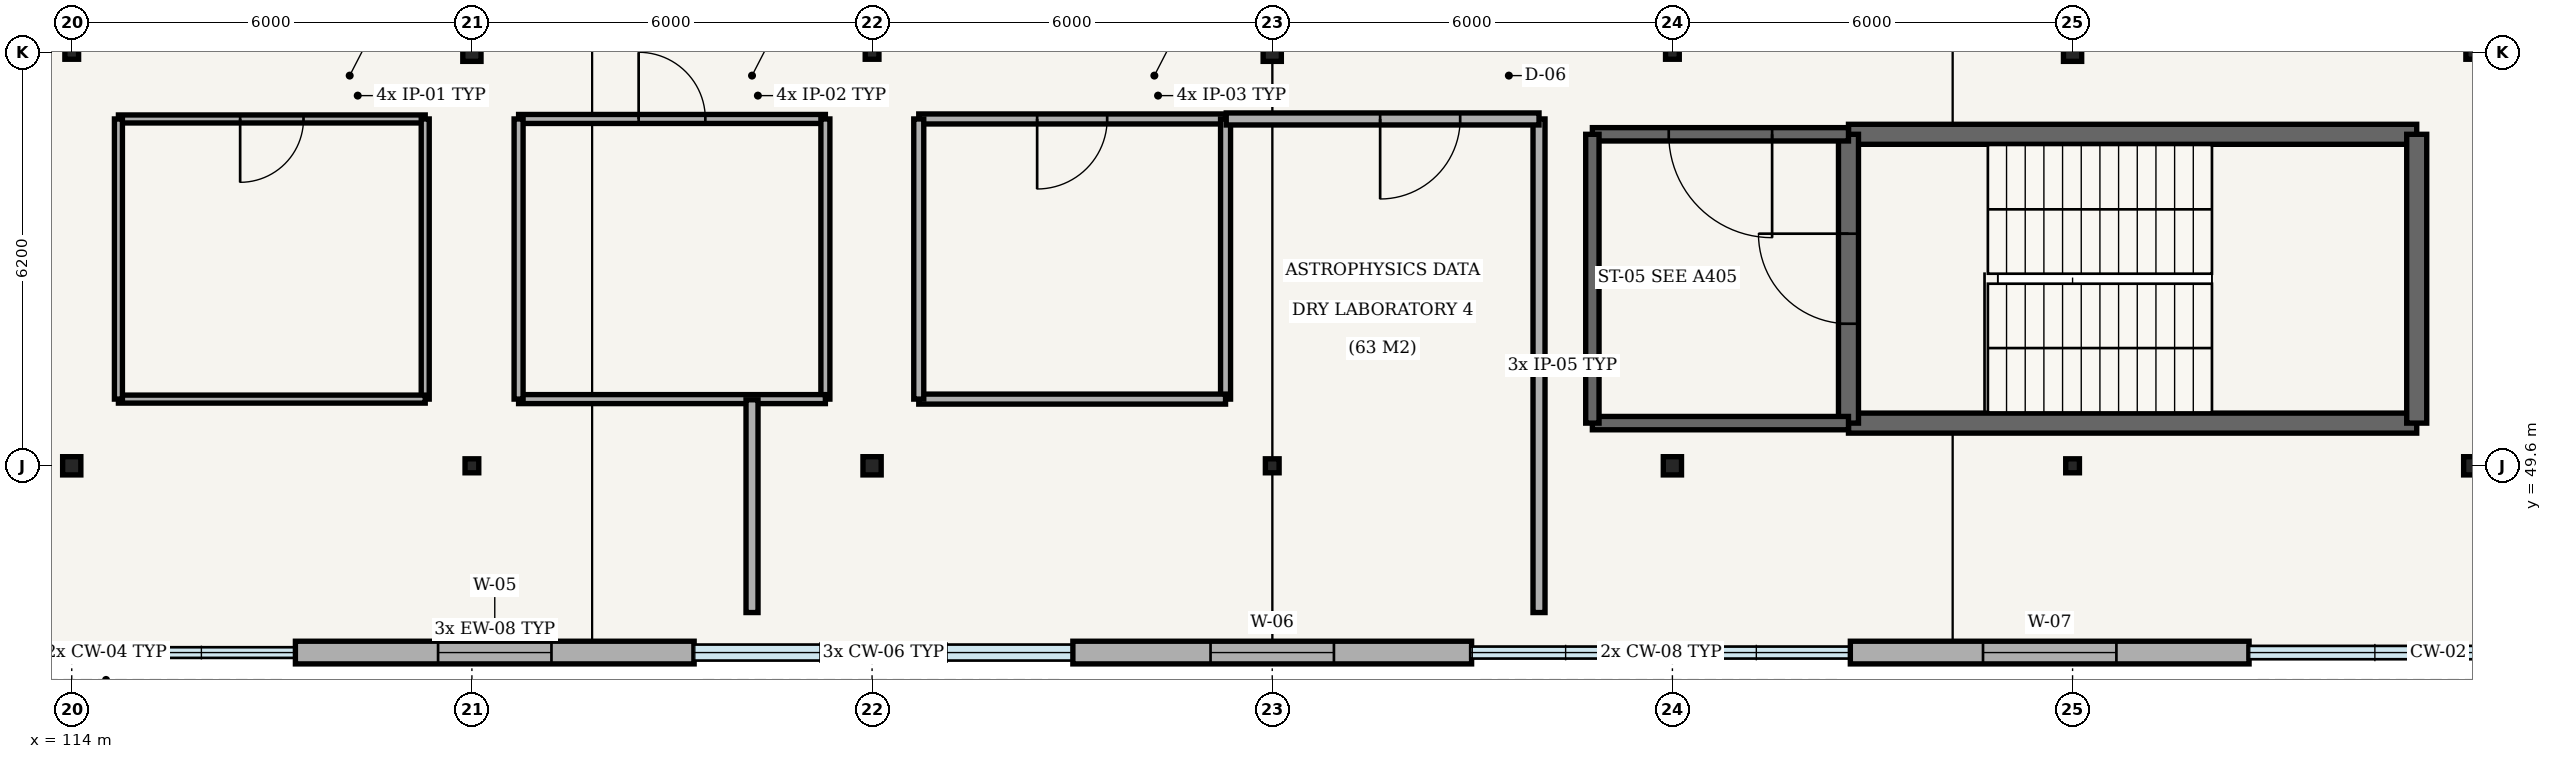
"""IFC4 building model, lengths in metres.
Left out: names, types, materials, properties, quantities, classifications, styles, units other than length and angle.
Written with IfcOpenShell. Run it as: python <this file> out.ifc"""

import sys

from ifc_helpers import new_model, si_unit, direction, frame, frame_2d, origin, origin_2d, place, context, subcontext, project, spatial, rectangle, hollow_circle, i_section, extrude, element, fill, save


model = new_model("IFC4")
c1 = context("Model", 3, precision=1e-05, world=origin(), true_north=direction((0.0, 1.0)))
c2 = subcontext(c1, "Body", "Model", "MODEL_VIEW")
j1 = project(units=[si_unit("LENGTHUNIT", "METRE"), si_unit("PLANEANGLEUNIT", "RADIAN")], contexts=[c1])
p1 = place(None, origin())
s1 = spatial("IfcSite", under=j1, at=p1, CompositionType="ELEMENT")
p2 = place(p1, origin())
s2 = spatial("IfcBuilding", under=s1, at=p2, CompositionType="ELEMENT")
p3 = place(p2, frame((0.0, 0.0, 20.4)))
s3 = spatial("IfcBuildingStorey", under=s2, at=p3, CompositionType="ELEMENT", Elevation=20.4)
p4 = place(p3, frame((114.0, 49.6, 0.0), z_axis=(0.0, 0.0, 1.0), x_axis=(1.0, 0.0, 0.0)))
e1 = element("IfcColumn", 1, at=p4, inside=s3, PredefinedType="COLUMN", context=c2, shape_type="SweptSolid", body=[
    extrude(hollow_circle(Radius=0.136, WallThickness=0.01, at=origin_2d()), origin(), (0.0, 0.0, 1.0), 4.55),
])
for number, where, z_axis, x_axis in (
    (2, (114.0, 55.8, 0.0), (0.0, 0.0, 1.0), (1.0, 0.0, 0.0)),
    (3, (120.0, 49.6, 0.0), (0.0, 0.0, 1.0), (1.0, 0.0, 0.0)),
):
    element("IfcColumn", number, at=place(p3, frame(where, z_axis=z_axis, x_axis=x_axis)), inside=s3, PredefinedType="COLUMN", context=c2, shape_type="SweptSolid", body=[
        extrude(i_section(OverallWidth=0.206, OverallDepth=0.21, WebThickness=0.01, FlangeThickness=0.014, FilletRadius=0.01, at=origin_2d()), origin(), (0.0, 0.0, 1.0), 4.55),
    ])
for number, where, z_axis, x_axis in (
    (4, (120.0, 55.8, 0.0), (0.0, 0.0, 1.0), (1.0, 0.0, 0.0)),
    (5, (126.0, 49.6, 0.0), (0.0, 0.0, 1.0), (1.0, 0.0, 0.0)),
):
    element("IfcColumn", number, at=place(p3, frame(where, z_axis=z_axis, x_axis=x_axis)), inside=s3, PredefinedType="COLUMN", context=c2, shape_type="SweptSolid", body=[
        extrude(hollow_circle(Radius=0.136, WallThickness=0.01, at=origin_2d()), origin(), (0.0, 0.0, 1.0), 4.55),
    ])
for number, where, z_axis, x_axis in (
    (6, (126.0, 55.8, 0.0), (0.0, 0.0, 1.0), (1.0, 0.0, 0.0)),
    (7, (132.0, 49.6, 0.0), (0.0, 0.0, 1.0), (1.0, 0.0, 0.0)),
):
    element("IfcColumn", number, at=place(p3, frame(where, z_axis=z_axis, x_axis=x_axis)), inside=s3, PredefinedType="COLUMN", context=c2, shape_type="SweptSolid", body=[
        extrude(i_section(OverallWidth=0.206, OverallDepth=0.21, WebThickness=0.01, FlangeThickness=0.014, FilletRadius=0.01, at=origin_2d()), origin(), (0.0, 0.0, 1.0), 4.55),
    ])
for number, where, z_axis, x_axis in (
    (8, (132.0, 55.8, 0.0), (0.0, 0.0, 1.0), (1.0, 0.0, 0.0)),
    (9, (138.0, 49.6, 0.0), (0.0, 0.0, 1.0), (1.0, 0.0, 0.0)),
):
    element("IfcColumn", number, at=place(p3, frame(where, z_axis=z_axis, x_axis=x_axis)), inside=s3, PredefinedType="COLUMN", context=c2, shape_type="SweptSolid", body=[
        extrude(hollow_circle(Radius=0.136, WallThickness=0.01, at=origin_2d()), origin(), (0.0, 0.0, 1.0), 4.55),
    ])
for number, where, z_axis, x_axis in (
    (10, (138.0, 55.8, 0.0), (0.0, 0.0, 1.0), (1.0, 0.0, 0.0)),
    (11, (144.0, 49.6, 0.0), (0.0, 0.0, 1.0), (1.0, 0.0, 0.0)),
):
    element("IfcColumn", number, at=place(p3, frame(where, z_axis=z_axis, x_axis=x_axis)), inside=s3, PredefinedType="COLUMN", context=c2, shape_type="SweptSolid", body=[
        extrude(i_section(OverallWidth=0.206, OverallDepth=0.21, WebThickness=0.01, FlangeThickness=0.014, FilletRadius=0.01, at=origin_2d()), origin(), (0.0, 0.0, 1.0), 4.55),
    ])
for number, where, z_axis, x_axis in (
    (12, (144.0, 55.8, 0.0), (0.0, 0.0, 1.0), (1.0, 0.0, 0.0)),
    (13, (150.0, 49.6, 0.0), (0.0, 0.0, 1.0), (1.0, 0.0, 0.0)),
):
    element("IfcColumn", number, at=place(p3, frame(where, z_axis=z_axis, x_axis=x_axis)), inside=s3, PredefinedType="COLUMN", context=c2, shape_type="SweptSolid", body=[
        extrude(hollow_circle(Radius=0.136, WallThickness=0.01, at=origin_2d()), origin(), (0.0, 0.0, 1.0), 4.55),
    ])
p5 = place(p3, frame((150.0, 55.8, 0.0), z_axis=(0.0, 0.0, 1.0), x_axis=(1.0, 0.0, 0.0)))
e14 = element("IfcColumn", 14, at=p5, inside=s3, PredefinedType="COLUMN", context=c2, shape_type="SweptSolid", body=[
    extrude(i_section(OverallWidth=0.206, OverallDepth=0.21, WebThickness=0.01, FlangeThickness=0.014, FilletRadius=0.01, at=origin_2d()), origin(), (0.0, 0.0, 1.0), 4.55),
])
p6 = place(p3, frame((117.354, 46.8, 0.0), z_axis=(0.0, 0.0, 1.0), x_axis=(1.0, 0.0, 0.0)))
e15 = element("IfcWall", 15, at=p6, inside=s3, PredefinedType="SOLIDWALL", context=c2, shape_type="SweptSolid", body=[
    extrude(rectangle(XDim=5.979, YDim=0.34, at=frame_2d((2.989, 0.0))), origin(), (0.0, 0.0, 1.0), 3.76),
])
p7 = place(p6, frame((2.139, 0.0, 0.9)))
e16 = element("IfcOpeningElement", 16, at=p7, cuts=e15, PredefinedType="OPENING", context=c2, shape_type="SweptSolid", body=[
    extrude(rectangle(XDim=1.7, YDim=1.3, at=frame_2d((0.85, 0.65))), frame((0.0, 0.18, 0.0), z_axis=(0.0, -1.0, 0.0), x_axis=(1.0, 0.0, 0.0)), (0.0, 0.0, 1.0), 0.36),
])
p8 = place(p3, frame((129.011, 46.8, 0.0), z_axis=(0.0, 0.0, 1.0), x_axis=(1.0, 0.0, 0.0)))
e17 = element("IfcWall", 17, at=p8, inside=s3, PredefinedType="SOLIDWALL", context=c2, shape_type="SweptSolid", body=[
    extrude(rectangle(XDim=5.979, YDim=0.34, at=frame_2d((2.989, 0.0))), origin(), (0.0, 0.0, 1.0), 3.76),
])
p9 = place(p8, frame((2.064, 0.0, 0.9)))
e18 = element("IfcOpeningElement", 18, at=p9, cuts=e17, PredefinedType="OPENING", context=c2, shape_type="SweptSolid", body=[
    extrude(rectangle(XDim=1.85, YDim=1.3, at=frame_2d((0.925, 0.65))), frame((0.0, 0.18, 0.0), z_axis=(0.0, -1.0, 0.0), x_axis=(1.0, 0.0, 0.0)), (0.0, 0.0, 1.0), 0.36),
])
p10 = place(p3, frame((140.668, 46.8, 0.0), z_axis=(0.0, 0.0, 1.0), x_axis=(1.0, 0.0, 0.0)))
e19 = element("IfcWall", 19, at=p10, inside=s3, PredefinedType="SOLIDWALL", context=c2, shape_type="SweptSolid", body=[
    extrude(rectangle(XDim=5.979, YDim=0.34, at=frame_2d((2.989, 0.0))), origin(), (0.0, 0.0, 1.0), 3.76),
])
p11 = place(p10, frame((1.989, 0.0, 0.9)))
e20 = element("IfcOpeningElement", 20, at=p11, cuts=e19, PredefinedType="OPENING", context=c2, shape_type="SweptSolid", body=[
    extrude(rectangle(XDim=2.0, YDim=1.3, at=frame_2d((1.0, 0.65))), frame((0.0, 0.18, 0.0), z_axis=(0.0, -1.0, 0.0), x_axis=(1.0, 0.0, 0.0)), (0.0, 0.0, 1.0), 0.36),
])
for number, where, z_axis, x_axis in (
    (21, (140.64, 50.24, 0.0), (0.0, 0.0, 1.0), (1.0, 0.0, 0.0)),
    (22, (149.16, 54.57, 0.0), (0.0, 0.0, 1.0), (-1.0, 0.0, 0.0)),
):
    element("IfcWall", number, at=place(p3, frame(where, z_axis=z_axis, x_axis=x_axis)), inside=s3, PredefinedType="SHEAR", context=c2, shape_type="SweptSolid", body=[
        extrude(rectangle(XDim=8.52, YDim=0.3, at=frame_2d((4.26, 0.0))), origin(), (0.0, 0.0, 1.0), 3.65),
    ])
p12 = place(p3, frame((140.64, 54.57, 0.0), z_axis=(0.0, 0.0, 1.0), x_axis=(0.0, -1.0, 0.0)))
e23 = element("IfcWall", 23, at=p12, inside=s3, PredefinedType="SHEAR", context=c2, shape_type="SweptSolid", body=[
    extrude(rectangle(XDim=4.33, YDim=0.3, at=frame_2d((2.165, 0.0))), origin(), (0.0, 0.0, 1.0), 3.65),
])
p13 = place(p12, frame((1.49, 0.0, 0.0)))
e24 = element("IfcOpeningElement", 24, at=p13, cuts=e23, PredefinedType="OPENING", context=c2, shape_type="SweptSolid", body=[
    extrude(rectangle(XDim=1.35, YDim=2.2, at=frame_2d((0.675, 1.1))), frame((0.0, 0.16, 0.0), z_axis=(0.0, -1.0, 0.0), x_axis=(1.0, 0.0, 0.0)), (0.0, 0.0, 1.0), 0.32),
])
p14 = place(p3, frame((149.16, 50.24, 0.0), z_axis=(0.0, 0.0, 1.0), x_axis=(0.0, 1.0, 0.0)))
e25 = element("IfcWall", 25, at=p14, inside=s3, PredefinedType="SHEAR", context=c2, shape_type="SweptSolid", body=[
    extrude(rectangle(XDim=4.33, YDim=0.3, at=frame_2d((2.165, 0.0))), origin(), (0.0, 0.0, 1.0), 3.65),
])
p15 = place(p3, frame((136.8, 50.24, 0.0), z_axis=(0.0, 0.0, 1.0), x_axis=(1.0, 0.0, 0.0)))
e26 = element("IfcWall", 26, at=p15, inside=s3, PredefinedType="SHEAR", context=c2, shape_type="SweptSolid", body=[
    extrude(rectangle(XDim=3.84, YDim=0.2, at=frame_2d((1.92, 0.0))), origin(), (0.0, 0.0, 1.0), 3.65),
])
p16 = place(p3, frame((140.64, 54.57, 0.0), z_axis=(0.0, 0.0, 1.0), x_axis=(-1.0, 0.0, 0.0)))
e27 = element("IfcWall", 27, at=p16, inside=s3, PredefinedType="SHEAR", context=c2, shape_type="SweptSolid", body=[
    extrude(rectangle(XDim=3.84, YDim=0.2, at=frame_2d((1.92, 0.0))), origin(), (0.0, 0.0, 1.0), 3.65),
])
p17 = place(p16, frame((1.145, 0.0, 0.0)))
e28 = element("IfcOpeningElement", 28, at=p17, cuts=e27, PredefinedType="OPENING", context=c2, shape_type="SweptSolid", body=[
    extrude(rectangle(XDim=1.55, YDim=2.2, at=frame_2d((0.775, 1.1))), frame((0.0, 0.11, 0.0), z_axis=(0.0, -1.0, 0.0), x_axis=(1.0, 0.0, 0.0)), (0.0, 0.0, 1.0), 0.22),
])
p18 = place(p3, frame((136.8, 54.57, 0.0), z_axis=(0.0, 0.0, 1.0), x_axis=(0.0, -1.0, 0.0)))
e29 = element("IfcWall", 29, at=p18, inside=s3, PredefinedType="SHEAR", context=c2, shape_type="SweptSolid", body=[
    extrude(rectangle(XDim=4.33, YDim=0.2, at=frame_2d((2.165, 0.0))), origin(), (0.0, 0.0, 1.0), 3.65),
])
p19 = place(p3, frame((114.7, 54.8, 0.0), z_axis=(0.0, 0.0, 1.0), x_axis=(1.0, 0.0, 0.0)))
e30 = element("IfcWall", 30, at=p19, inside=s3, PredefinedType="PARTITIONING", context=c2, shape_type="SweptSolid", body=[
    extrude(rectangle(XDim=4.6, YDim=0.12, at=frame_2d((2.3, 0.0))), origin(), (0.0, 0.0, 1.0), 3.65),
])
p20 = place(p19, frame((1.825, 0.0, 0.0)))
e31 = element("IfcOpeningElement", 31, at=p20, cuts=e30, PredefinedType="OPENING", context=c2, shape_type="SweptSolid", body=[
    extrude(rectangle(XDim=0.95, YDim=2.1, at=frame_2d((0.475, 1.05))), frame((0.0, 0.07, 0.0), z_axis=(0.0, -1.0, 0.0), x_axis=(1.0, 0.0, 0.0)), (0.0, 0.0, 1.0), 0.14),
])
p21 = place(p3, frame((119.3, 54.8, 0.0), z_axis=(0.0, 0.0, 1.0), x_axis=(0.0, -1.0, 0.0)))
e32 = element("IfcWall", 32, at=p21, inside=s3, PredefinedType="PARTITIONING", context=c2, shape_type="SweptSolid", body=[
    extrude(rectangle(XDim=4.2, YDim=0.12, at=frame_2d((2.1, 0.0))), origin(), (0.0, 0.0, 1.0), 3.65),
])
p22 = place(p3, frame((119.3, 50.6, 0.0), z_axis=(0.0, 0.0, 1.0), x_axis=(-1.0, 0.0, 0.0)))
e33 = element("IfcWall", 33, at=p22, inside=s3, PredefinedType="PARTITIONING", context=c2, shape_type="SweptSolid", body=[
    extrude(rectangle(XDim=4.6, YDim=0.12, at=frame_2d((2.3, 0.0))), origin(), (0.0, 0.0, 1.0), 3.65),
])
p23 = place(p3, frame((114.7, 50.6, 0.0), z_axis=(0.0, 0.0, 1.0), x_axis=(0.0, 1.0, 0.0)))
e34 = element("IfcWall", 34, at=p23, inside=s3, PredefinedType="PARTITIONING", context=c2, shape_type="SweptSolid", body=[
    extrude(rectangle(XDim=4.2, YDim=0.12, at=frame_2d((2.1, 0.0))), origin(), (0.0, 0.0, 1.0), 3.65),
])
p24 = place(p3, frame((120.7, 54.8, 0.0), z_axis=(0.0, 0.0, 1.0), x_axis=(1.0, 0.0, 0.0)))
e35 = element("IfcWall", 35, at=p24, inside=s3, PredefinedType="PARTITIONING", context=c2, shape_type="SweptSolid", body=[
    extrude(rectangle(XDim=4.6, YDim=0.135, at=frame_2d((2.3, 0.0))), origin(), (0.0, 0.0, 1.0), 3.65),
])
p25 = place(p24, frame((1.8, 0.0, 0.0)))
e36 = element("IfcOpeningElement", 36, at=p25, cuts=e35, PredefinedType="OPENING", context=c2, shape_type="SweptSolid", body=[
    extrude(rectangle(XDim=1.0, YDim=2.1, at=frame_2d((0.5, 1.05))), frame((0.0, 0.077, 0.0), z_axis=(0.0, -1.0, 0.0), x_axis=(1.0, 0.0, 0.0)), (0.0, 0.0, 1.0), 0.155),
])
p26 = place(p3, frame((125.3, 54.8, 0.0), z_axis=(0.0, 0.0, 1.0), x_axis=(0.0, -1.0, 0.0)))
e37 = element("IfcWall", 37, at=p26, inside=s3, PredefinedType="PARTITIONING", context=c2, shape_type="SweptSolid", body=[
    extrude(rectangle(XDim=4.2, YDim=0.135, at=frame_2d((2.1, 0.0))), origin(), (0.0, 0.0, 1.0), 3.65),
])
p27 = place(p3, frame((125.3, 50.6, 0.0), z_axis=(0.0, 0.0, 1.0), x_axis=(-1.0, 0.0, 0.0)))
e38 = element("IfcWall", 38, at=p27, inside=s3, PredefinedType="PARTITIONING", context=c2, shape_type="SweptSolid", body=[
    extrude(rectangle(XDim=4.6, YDim=0.135, at=frame_2d((2.3, 0.0))), origin(), (0.0, 0.0, 1.0), 3.65),
])
p28 = place(p3, frame((120.7, 50.6, 0.0), z_axis=(0.0, 0.0, 1.0), x_axis=(0.0, 1.0, 0.0)))
e39 = element("IfcWall", 39, at=p28, inside=s3, PredefinedType="PARTITIONING", context=c2, shape_type="SweptSolid", body=[
    extrude(rectangle(XDim=4.2, YDim=0.135, at=frame_2d((2.1, 0.0))), origin(), (0.0, 0.0, 1.0), 3.65),
])
p29 = place(p3, frame((126.7, 54.8, 0.0), z_axis=(0.0, 0.0, 1.0), x_axis=(1.0, 0.0, 0.0)))
e40 = element("IfcWall", 40, at=p29, inside=s3, PredefinedType="PARTITIONING", context=c2, shape_type="SweptSolid", body=[
    extrude(rectangle(XDim=4.6, YDim=0.15, at=frame_2d((2.3, 0.0))), origin(), (0.0, 0.0, 1.0), 3.65),
])
p30 = place(p29, frame((1.775, 0.0, 0.0)))
e41 = element("IfcOpeningElement", 41, at=p30, cuts=e40, PredefinedType="OPENING", context=c2, shape_type="SweptSolid", body=[
    extrude(rectangle(XDim=1.05, YDim=2.1, at=frame_2d((0.525, 1.05))), frame((0.0, 0.085, 0.0), z_axis=(0.0, -1.0, 0.0), x_axis=(1.0, 0.0, 0.0)), (0.0, 0.0, 1.0), 0.17),
])
p31 = place(p3, frame((131.3, 54.8, 0.0), z_axis=(0.0, 0.0, 1.0), x_axis=(0.0, -1.0, 0.0)))
e42 = element("IfcWall", 42, at=p31, inside=s3, PredefinedType="PARTITIONING", context=c2, shape_type="SweptSolid", body=[
    extrude(rectangle(XDim=4.2, YDim=0.15, at=frame_2d((2.1, 0.0))), origin(), (0.0, 0.0, 1.0), 3.65),
])
p32 = place(p3, frame((131.3, 50.6, 0.0), z_axis=(0.0, 0.0, 1.0), x_axis=(-1.0, 0.0, 0.0)))
e43 = element("IfcWall", 43, at=p32, inside=s3, PredefinedType="PARTITIONING", context=c2, shape_type="SweptSolid", body=[
    extrude(rectangle(XDim=4.6, YDim=0.15, at=frame_2d((2.3, 0.0))), origin(), (0.0, 0.0, 1.0), 3.65),
])
p33 = place(p3, frame((126.7, 50.6, 0.0), z_axis=(0.0, 0.0, 1.0), x_axis=(0.0, 1.0, 0.0)))
e44 = element("IfcWall", 44, at=p33, inside=s3, PredefinedType="PARTITIONING", context=c2, shape_type="SweptSolid", body=[
    extrude(rectangle(XDim=4.2, YDim=0.15, at=frame_2d((2.1, 0.0))), origin(), (0.0, 0.0, 1.0), 3.65),
])
p34 = place(p3, frame((136.0, 54.8, 0.0), z_axis=(0.0, 0.0, 1.0), x_axis=(0.0, -1.0, 0.0)))
e45 = element("IfcWall", 45, at=p34, inside=s3, PredefinedType="PARTITIONING", context=c2, shape_type="SweptSolid", body=[
    extrude(rectangle(XDim=7.4, YDim=0.18, at=frame_2d((3.7, 0.0))), origin(), (0.0, 0.0, 1.0), 3.65),
])
p35 = place(p3, frame((124.2, 47.4, 0.0), z_axis=(0.0, 0.0, 1.0), x_axis=(0.0, 1.0, 0.0)))
e46 = element("IfcWall", 46, at=p35, inside=s3, PredefinedType="PARTITIONING", context=c2, shape_type="SweptSolid", body=[
    extrude(rectangle(XDim=3.19, YDim=0.18, at=frame_2d((1.595, 0.0))), origin(), (0.0, 0.0, 1.0), 3.65),
])
p36 = place(p3, frame((131.31, 54.8, 0.0), z_axis=(0.0, 0.0, 1.0), x_axis=(1.0, 0.0, 0.0)))
e47 = element("IfcWall", 47, at=p36, inside=s3, PredefinedType="PARTITIONING", context=c2, shape_type="SweptSolid", body=[
    extrude(rectangle(XDim=4.69, YDim=0.18, at=frame_2d((2.345, 0.0))), origin(), (0.0, 0.0, 1.0), 3.65),
])
p37 = place(p36, frame((2.308, 0.0, 0.0)))
e48 = element("IfcOpeningElement", 48, at=p37, cuts=e47, PredefinedType="OPENING", context=c2, shape_type="SweptSolid", body=[
    extrude(rectangle(XDim=1.2, YDim=2.1, at=frame_2d((0.6, 1.05))), frame((0.0, 0.1, 0.0), z_axis=(0.0, -1.0, 0.0), x_axis=(1.0, 0.0, 0.0)), (0.0, 0.0, 1.0), 0.2),
])
p38 = place(p7, origin())
e49 = element("IfcWindow", 49, at=p38, inside=s3, PartitioningType="SINGLE_PANEL", PredefinedType="WINDOW", context=c2, shape_type="SweptSolid", body=[
    extrude(rectangle(XDim=1.7, YDim=1.3, at=frame_2d((0.85, 0.65))), frame((0.0, 0.03, 0.0), z_axis=(0.0, -1.0, 0.0), x_axis=(1.0, 0.0, 0.0)), (0.0, 0.0, 1.0), 0.06),
])
fill(e16, e49)
p39 = place(p9, origin())
e50 = element("IfcWindow", 50, at=p39, inside=s3, PartitioningType="DOUBLE_PANEL_VERTICAL", PredefinedType="WINDOW", context=c2, shape_type="SweptSolid", body=[
    extrude(rectangle(XDim=1.85, YDim=1.3, at=frame_2d((0.925, 0.65))), frame((0.0, 0.03, 0.0), z_axis=(0.0, -1.0, 0.0), x_axis=(1.0, 0.0, 0.0)), (0.0, 0.0, 1.0), 0.06),
])
fill(e18, e50)
p40 = place(p11, origin())
e51 = element("IfcWindow", 51, at=p40, inside=s3, PartitioningType="DOUBLE_PANEL_VERTICAL", PredefinedType="WINDOW", context=c2, shape_type="SweptSolid", body=[
    extrude(rectangle(XDim=2.0, YDim=1.3, at=frame_2d((1.0, 0.65))), frame((0.0, 0.03, 0.0), z_axis=(0.0, -1.0, 0.0), x_axis=(1.0, 0.0, 0.0)), (0.0, 0.0, 1.0), 0.06),
])
fill(e20, e51)
p41 = place(p13, origin())
e52 = element("IfcDoor", 52, at=p41, inside=s3, OperationType="SINGLE_SWING_RIGHT", PredefinedType="DOOR", context=c2, shape_type="SweptSolid", body=[
    extrude(rectangle(XDim=1.35, YDim=2.2, at=frame_2d((0.675, 1.1))), frame((0.0, 0.025, 0.0), z_axis=(0.0, -1.0, 0.0), x_axis=(1.0, 0.0, 0.0)), (0.0, 0.0, 1.0), 0.05),
])
fill(e24, e52)
p42 = place(p17, origin())
e53 = element("IfcDoor", 53, at=p42, inside=s3, OperationType="SINGLE_SWING_LEFT", PredefinedType="DOOR", context=c2, shape_type="SweptSolid", body=[
    extrude(rectangle(XDim=1.55, YDim=2.2, at=frame_2d((0.775, 1.1))), frame((0.0, 0.025, 0.0), z_axis=(0.0, -1.0, 0.0), x_axis=(1.0, 0.0, 0.0)), (0.0, 0.0, 1.0), 0.05),
])
fill(e28, e53)
p43 = place(p20, origin())
e54 = element("IfcDoor", 54, at=p43, inside=s3, OperationType="SINGLE_SWING_RIGHT", PredefinedType="DOOR", context=c2, shape_type="SweptSolid", body=[
    extrude(rectangle(XDim=0.95, YDim=2.1, at=frame_2d((0.475, 1.05))), frame((0.0, 0.025, 0.0), z_axis=(0.0, -1.0, 0.0), x_axis=(1.0, 0.0, 0.0)), (0.0, 0.0, 1.0), 0.05),
])
fill(e31, e54)
p44 = place(p25, origin())
e55 = element("IfcDoor", 55, at=p44, inside=s3, OperationType="SINGLE_SWING_LEFT", PredefinedType="DOOR", context=c2, shape_type="SweptSolid", body=[
    extrude(rectangle(XDim=1.0, YDim=2.1, at=frame_2d((0.5, 1.05))), frame((0.0, 0.025, 0.0), z_axis=(0.0, -1.0, 0.0), x_axis=(1.0, 0.0, 0.0)), (0.0, 0.0, 1.0), 0.05),
])
fill(e36, e55)
p45 = place(p30, origin())
e56 = element("IfcDoor", 56, at=p45, inside=s3, OperationType="SINGLE_SWING_RIGHT", PredefinedType="DOOR", context=c2, shape_type="SweptSolid", body=[
    extrude(rectangle(XDim=1.05, YDim=2.1, at=frame_2d((0.525, 1.05))), frame((0.0, 0.025, 0.0), z_axis=(0.0, -1.0, 0.0), x_axis=(1.0, 0.0, 0.0)), (0.0, 0.0, 1.0), 0.05),
])
fill(e41, e56)
p46 = place(p37, origin())
e57 = element("IfcDoor", 57, at=p46, inside=s3, OperationType="SINGLE_SWING_RIGHT", PredefinedType="DOOR", context=c2, shape_type="SweptSolid", body=[
    extrude(rectangle(XDim=1.2, YDim=2.1, at=frame_2d((0.6, 1.05))), frame((0.0, 0.025, 0.0), z_axis=(0.0, -1.0, 0.0), x_axis=(1.0, 0.0, 0.0)), (0.0, 0.0, 1.0), 0.05),
])
fill(e48, e57)
save(model, sys.argv[1])
